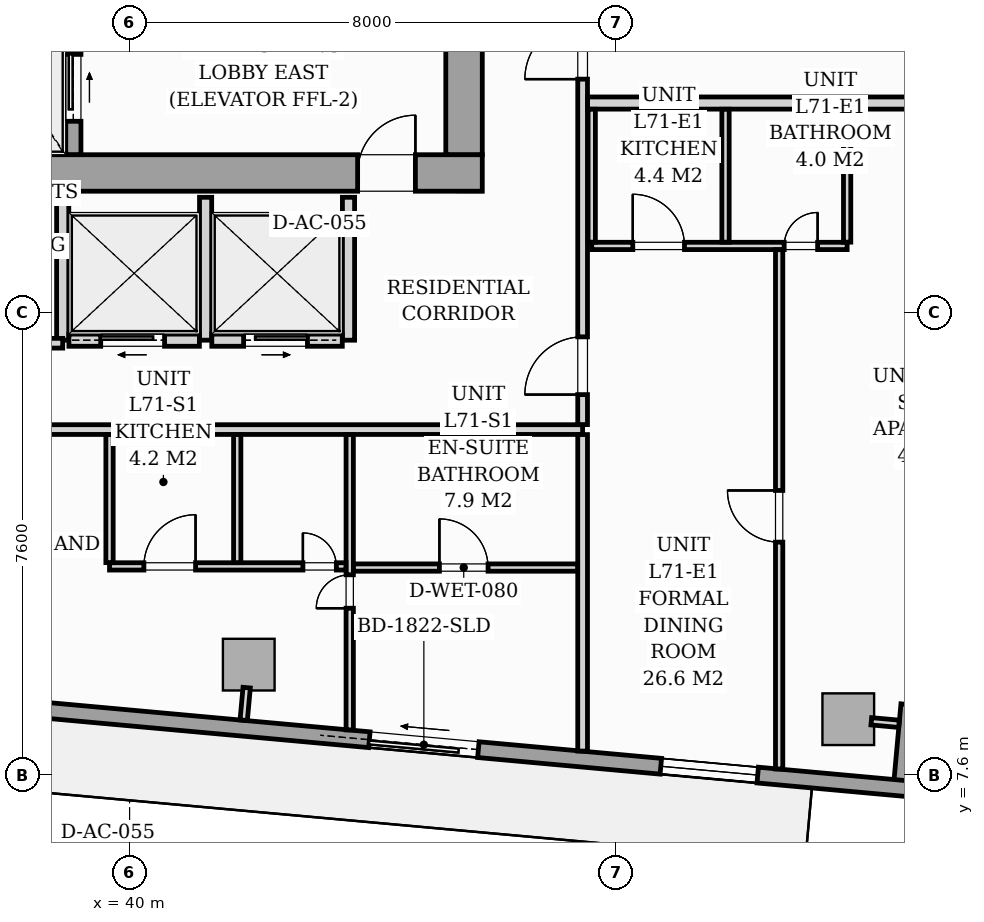
"""IFC4 building model, lengths in metres.
Left out: names, types, materials, properties, quantities, classifications, styles, units other than length and angle.
Written with IfcOpenShell. Run it as: python <this file> out.ifc"""

import sys

from ifc_helpers import new_model, si_unit, direction, frame, frame_2d, origin, origin_2d, place, context, subcontext, project, spatial, rectangle, i_section, extrude, source, transform, mapped, element, fill, save


model = new_model("IFC4")
c1 = context("Model", 3, precision=1e-05, world=origin(), true_north=direction((0.0, 1.0)))
c2 = subcontext(c1, "Body", "Model", "MODEL_VIEW")
j1 = project(units=[si_unit("LENGTHUNIT", "METRE"), si_unit("PLANEANGLEUNIT", "RADIAN")], contexts=[c1])
p1 = place(None, origin())
s1 = spatial("IfcSite", under=j1, at=p1, CompositionType="ELEMENT")
p2 = place(p1, origin())
s2 = spatial("IfcBuilding", under=s1, at=p2, CompositionType="ELEMENT")
p3 = place(p2, frame((0.0, 0.0, 246.3)))
s3 = spatial("IfcBuildingStorey", under=s2, at=p3, CompositionType="ELEMENT", Elevation=246.3)
m1 = source(origin(), c2, "Body", "SweptSolid", [
    extrude(i_section(OverallWidth=0.409, OverallDepth=0.425, WebThickness=0.033, FlangeThickness=0.052, FilletRadius=0.018, at=origin_2d()), origin(), (0.0, 0.0, 1.0), 3.296),
])
for number, where, z_axis, x_axis in (
    (1, (38.88, 17.4, 0.002), (0.0, 0.0, 1.0), (1.0, 0.0, 0.0)),
    (2, (45.6, 17.4, 0.002), (0.0, 0.0, 1.0), (1.0, 0.0, 0.0)),
):
    element("IfcColumn", number, at=place(p3, frame(where, z_axis=z_axis, x_axis=x_axis)), inside=s3, PredefinedType="PILASTER", context=c2, shape_type="MappedRepresentation", body=[
        mapped(m1, transform((0.0, 0.0, 0.0), scale=1.0)),
    ])
m2 = source(origin(), c2, "Body", "SweptSolid", [
    extrude(rectangle(XDim=0.85, YDim=0.85, at=origin_2d()), origin(), (0.0, 0.0, 1.0), 3.296),
])
for number, where, z_axis, x_axis in (
    (3, (41.96, 9.415, 0.002), (0.0, 0.0, 1.0), (0.996, -0.091, 0.0)),
    (4, (51.819, 8.517, 0.002), (0.0, 0.0, 1.0), (0.996, -0.091, 0.0)),
):
    element("IfcColumn", number, at=place(p3, frame(where, z_axis=z_axis, x_axis=x_axis)), inside=s3, PredefinedType="COLUMN", context=c2, shape_type="MappedRepresentation", body=[
        mapped(m2, transform((0.0, 0.0, 0.0), scale=1.0)),
    ])
p4 = place(p3, frame((52.815, 8.758, 0.0), z_axis=(0.0, 0.0, 1.0), x_axis=(-0.090646191665, -0.995883159782, 0.0)))
e5 = element("IfcWall", 5, at=p4, inside=s3, PredefinedType="STANDARD", context=c2, shape_type="SweptSolid", body=[
    extrude(rectangle(XDim=1.395, YDim=0.26, at=frame_2d((0.698, 0.0))), origin(), (0.0, 0.0, 1.0), 3.04),
])
p5 = place(p3, frame((52.819, 7.372, 0.0), z_axis=(0.0, 0.0, 1.0), x_axis=(-0.995884447498, 0.090632043071, 0.0)))
e6 = element("IfcWall", 6, at=p5, inside=s3, PredefinedType="STANDARD", context=c2, shape_type="SweptSolid", body=[
    extrude(rectangle(XDim=14.63, YDim=0.26, at=frame_2d((7.315, 0.0))), origin(), (0.0, 0.0, 1.0), 3.04),
])
p6 = place(p5, frame((7.113, 0.0, 0.0)))
e7 = element("IfcOpeningElement", 7, at=p6, cuts=e6, PredefinedType="OPENING", context=c2, shape_type="SweptSolid", body=[
    extrude(rectangle(XDim=1.8, YDim=2.06, at=frame_2d((0.9, 1.03))), frame((0.0, 0.14, 0.0), z_axis=(0.0, -1.0, 0.0), x_axis=(1.0, 0.0, 0.0)), (0.0, 0.0, 1.0), 0.28),
])
p7 = place(p5, frame((2.5, 0.0, 0.65)))
e8 = element("IfcOpeningElement", 8, at=p7, cuts=e6, PredefinedType="OPENING", context=c2, shape_type="SweptSolid", body=[
    extrude(rectangle(XDim=1.6, YDim=1.5, at=frame_2d((0.8, 0.75))), frame((0.0, 0.14, 0.0), z_axis=(0.0, -1.0, 0.0), x_axis=(1.0, 0.0, 0.0)), (0.0, 0.0, 1.0), 0.28),
])
p8 = place(p3, frame((26.2, 17.5, 0.0), z_axis=(0.0, 0.0, 1.0), x_axis=(1.0, 0.0, 0.0)))
e9 = element("IfcWall", 9, at=p8, inside=s3, PredefinedType="SHEAR", context=c2, shape_type="SweptSolid", body=[
    extrude(rectangle(XDim=19.6, YDim=0.6, at=frame_2d((9.8, 0.0))), origin(), (0.0, 0.0, 1.0), 3.3),
])
p9 = place(p8, frame((0.95, 0.0, 0.0)))
e10 = element("IfcOpeningElement", 10, at=p9, cuts=e9, PredefinedType="OPENING", context=c2, shape_type="SweptSolid", body=[
    extrude(rectangle(XDim=0.95, YDim=2.06, at=frame_2d((0.475, 1.03))), frame((0.0, 0.31, 0.0), z_axis=(0.0, -1.0, 0.0), x_axis=(1.0, 0.0, 0.0)), (0.0, 0.0, 1.0), 0.62),
])
p10 = place(p8, frame((9.38, 0.0, 0.0)))
e11 = element("IfcOpeningElement", 11, at=p10, cuts=e9, PredefinedType="OPENING", context=c2, shape_type="SweptSolid", body=[
    extrude(rectangle(XDim=0.85, YDim=2.0, at=frame_2d((0.425, 1.0))), frame((0.0, 0.31, 0.0), z_axis=(0.0, -1.0, 0.0), x_axis=(1.0, 0.0, 0.0)), (0.0, 0.0, 1.0), 0.62),
])
p11 = place(p8, frame((17.55, 0.0, 0.0)))
e12 = element("IfcOpeningElement", 12, at=p11, cuts=e9, PredefinedType="OPENING", context=c2, shape_type="SweptSolid", body=[
    extrude(rectangle(XDim=0.95, YDim=2.06, at=frame_2d((0.475, 1.03))), frame((0.0, 0.31, 0.0), z_axis=(0.0, -1.0, 0.0), x_axis=(1.0, 0.0, 0.0)), (0.0, 0.0, 1.0), 0.62),
])
p12 = place(p3, frame((45.5, 17.802, 0.0), z_axis=(0.0, 0.0, 1.0), x_axis=(0.0, 1.0, 0.0)))
e13 = element("IfcWall", 13, at=p12, inside=s3, PredefinedType="SHEAR", context=c2, shape_type="SweptSolid", body=[
    extrude(rectangle(XDim=5.796, YDim=0.6, at=frame_2d((2.898, 0.0))), origin(), (0.0, 0.0, 1.0), 3.3),
])
p13 = place(p3, frame((39.075, 17.802, 0.0), z_axis=(0.0, 0.0, 1.0), x_axis=(0.0, 1.0, 0.0)))
e14 = element("IfcWall", 14, at=p13, inside=s3, PredefinedType="SOLIDWALL", context=c2, shape_type="SweptSolid", body=[
    extrude(rectangle(XDim=2.646, YDim=0.25, at=frame_2d((1.323, 0.0))), origin(), (0.0, 0.0, 1.0), 3.3),
])
p14 = place(p13, frame((0.548, 0.0, 0.0)))
e15 = element("IfcOpeningElement", 15, at=p14, cuts=e14, PredefinedType="OPENING", context=c2, shape_type="SweptSolid", body=[
    extrude(rectangle(XDim=1.1, YDim=2.08, at=frame_2d((0.55, 1.04))), frame((0.0, 0.135, 0.0), z_axis=(0.0, -1.0, 0.0), x_axis=(1.0, 0.0, 0.0)), (0.0, 0.0, 1.0), 0.27),
])
for number, where, z_axis, x_axis in (
    (16, (38.9, 14.75, 0.0), (0.0, 0.0, 1.0), (0.0, 1.0, 0.0)),
    (17, (41.25, 14.75, 0.0), (0.0, 0.0, 1.0), (0.0, 1.0, 0.0)),
    (18, (43.6, 14.75, 0.0), (0.0, 0.0, 1.0), (0.0, 1.0, 0.0)),
):
    element("IfcWall", number, at=place(p3, frame(where, z_axis=z_axis, x_axis=x_axis)), inside=s3, PredefinedType="PARTITIONING", context=c2, shape_type="SweptSolid", body=[
        extrude(rectangle(XDim=2.35, YDim=0.2, at=frame_2d((1.175, 0.0))), origin(), (0.0, 0.0, 1.0), 3.04),
    ])
p15 = place(p3, frame((39.002, 14.75, 0.0), z_axis=(0.0, 0.0, 1.0), x_axis=(1.0, 0.0, 0.0)))
e19 = element("IfcWall", 19, at=p15, inside=s3, PredefinedType="PARTITIONING", context=c2, shape_type="SweptSolid", body=[
    extrude(rectangle(XDim=2.146, YDim=0.2, at=frame_2d((1.073, 0.0))), origin(), (0.0, 0.0, 1.0), 3.04),
])
p16 = place(p15, frame((0.523, 0.0, 0.0)))
e20 = element("IfcOpeningElement", 20, at=p16, cuts=e19, PredefinedType="OPENING", context=c2, shape_type="SweptSolid", body=[
    extrude(rectangle(XDim=1.05, YDim=2.08, at=frame_2d((0.525, 1.04))), frame((0.0, 0.11, 0.0), z_axis=(0.0, -1.0, 0.0), x_axis=(1.0, 0.0, 0.0)), (0.0, 0.0, 1.0), 0.22),
])
p17 = place(p3, frame((41.352, 14.75, 0.0), z_axis=(0.0, 0.0, 1.0), x_axis=(1.0, 0.0, 0.0)))
e21 = element("IfcWall", 21, at=p17, inside=s3, PredefinedType="PARTITIONING", context=c2, shape_type="SweptSolid", body=[
    extrude(rectangle(XDim=2.146, YDim=0.2, at=frame_2d((1.073, 0.0))), origin(), (0.0, 0.0, 1.0), 3.04),
])
p18 = place(p17, frame((0.523, 0.0, 0.0)))
e22 = element("IfcOpeningElement", 22, at=p18, cuts=e21, PredefinedType="OPENING", context=c2, shape_type="SweptSolid", body=[
    extrude(rectangle(XDim=1.05, YDim=2.08, at=frame_2d((0.525, 1.04))), frame((0.0, 0.11, 0.0), z_axis=(0.0, -1.0, 0.0), x_axis=(1.0, 0.0, 0.0)), (0.0, 0.0, 1.0), 0.22),
])
p19 = place(p3, frame((24.55, 13.28, 0.0), z_axis=(0.0, 0.0, 1.0), x_axis=(1.0, 0.0, 0.0)))
e23 = element("IfcWall", 23, at=p19, inside=s3, PredefinedType="PARTITIONING", context=c2, shape_type="SweptSolid", body=[
    extrude(rectangle(XDim=22.9, YDim=0.16, at=frame_2d((11.45, 0.0))), origin(), (0.0, 0.0, 1.0), 2.556),
])
p20 = place(p19, frame((7.125, 0.0, 0.0)))
e24 = element("IfcOpeningElement", 24, at=p20, cuts=e23, PredefinedType="OPENING", context=c2, shape_type="SweptSolid", body=[
    extrude(rectangle(XDim=0.95, YDim=2.06, at=frame_2d((0.475, 1.03))), frame((0.0, 0.09, 0.0), z_axis=(0.0, -1.0, 0.0), x_axis=(1.0, 0.0, 0.0)), (0.0, 0.0, 1.0), 0.18),
])
p21 = place(p3, frame((47.45, 7.993, 0.0), z_axis=(0.0, 0.0, 1.0), x_axis=(0.0, 1.0, 0.0)))
e25 = element("IfcWall", 25, at=p21, inside=s3, PredefinedType="PARTITIONING", context=c2, shape_type="SweptSolid", body=[
    extrude(rectangle(XDim=5.205, YDim=0.16, at=frame_2d((2.603, 0.0))), origin(), (0.0, 0.0, 1.0), 3.04),
])
p22 = place(p3, frame((47.45, 13.362, 0.0), z_axis=(0.0, 0.0, 1.0), x_axis=(0.0, 1.0, 0.0)))
e26 = element("IfcWall", 26, at=p22, inside=s3, PredefinedType="PARTITIONING", context=c2, shape_type="SweptSolid", body=[
    extrude(rectangle(XDim=7.288, YDim=0.16, at=frame_2d((3.644, 0.0))), origin(), (0.0, 0.0, 1.0), 3.04),
])
p23 = place(p22, frame((0.493, 0.0, 0.0)))
e27 = element("IfcOpeningElement", 27, at=p23, cuts=e26, PredefinedType="OPENING", context=c2, shape_type="SweptSolid", body=[
    extrude(rectangle(XDim=0.95, YDim=2.06, at=frame_2d((0.475, 1.03))), frame((0.0, 0.09, 0.0), z_axis=(0.0, -1.0, 0.0), x_axis=(1.0, 0.0, 0.0)), (0.0, 0.0, 1.0), 0.18),
])
p24 = place(p22, frame((5.681, 0.0, 0.0)))
e28 = element("IfcOpeningElement", 28, at=p24, cuts=e26, PredefinedType="OPENING", context=c2, shape_type="SweptSolid", body=[
    extrude(rectangle(XDim=0.95, YDim=2.06, at=frame_2d((0.475, 1.03))), frame((0.0, 0.09, 0.0), z_axis=(0.0, -1.0, 0.0), x_axis=(1.0, 0.0, 0.0)), (0.0, 0.0, 1.0), 0.18),
])
p25 = place(p3, frame((43.62, 8.342, 0.0), z_axis=(0.0, 0.0, 1.0), x_axis=(0.0, 1.0, 0.0)))
e29 = element("IfcWall", 29, at=p25, inside=s3, PredefinedType="PARTITIONING", context=c2, shape_type="SweptSolid", body=[
    extrude(rectangle(XDim=4.856, YDim=0.12, at=frame_2d((2.428, 0.0))), origin(), (0.0, 0.0, 1.0), 3.04),
])
p26 = place(p25, frame((2.0, 0.0, 0.0)))
e30 = element("IfcOpeningElement", 30, at=p26, cuts=e29, PredefinedType="OPENING", context=c2, shape_type="SweptSolid", body=[
    extrude(rectangle(XDim=0.55, YDim=2.0, at=frame_2d((0.275, 1.0))), frame((0.0, 0.07, 0.0), z_axis=(0.0, -1.0, 0.0), x_axis=(1.0, 0.0, 0.0)), (0.0, 0.0, 1.0), 0.14),
])
p27 = place(p3, frame((39.67, 11.03, 0.0), z_axis=(0.0, 0.0, 1.0), x_axis=(1.0, 0.0, 0.0)))
e31 = element("IfcWall", 31, at=p27, inside=s3, PredefinedType="PARTITIONING", context=c2, shape_type="SweptSolid", body=[
    extrude(rectangle(XDim=3.888, YDim=0.12, at=frame_2d((1.944, 0.0))), origin(), (0.0, 0.0, 1.0), 3.04),
])
p28 = place(p27, frame((0.565, 0.0, 0.0)))
e32 = element("IfcOpeningElement", 32, at=p28, cuts=e31, PredefinedType="OPENING", context=c2, shape_type="SweptSolid", body=[
    extrude(rectangle(XDim=0.85, YDim=2.05, at=frame_2d((0.425, 1.025))), frame((0.0, 0.07, 0.0), z_axis=(0.0, -1.0, 0.0), x_axis=(1.0, 0.0, 0.0)), (0.0, 0.0, 1.0), 0.14),
])
p29 = place(p27, frame((3.18, 0.0, 0.0)))
e33 = element("IfcOpeningElement", 33, at=p29, cuts=e31, PredefinedType="OPENING", context=c2, shape_type="SweptSolid", body=[
    extrude(rectangle(XDim=0.55, YDim=2.0, at=frame_2d((0.275, 1.0))), frame((0.0, 0.07, 0.0), z_axis=(0.0, -1.0, 0.0), x_axis=(1.0, 0.0, 0.0)), (0.0, 0.0, 1.0), 0.14),
])
for number, where, z_axis, x_axis in (
    (34, (41.77, 11.092, 0.0), (0.0, 0.0, 1.0), (0.0, 1.0, 0.0)),
    (35, (39.67, 11.092, 0.0), (0.0, 0.0, 1.0), (0.0, 1.0, 0.0)),
):
    element("IfcWall", number, at=place(p3, frame(where, z_axis=z_axis, x_axis=x_axis)), inside=s3, PredefinedType="PARTITIONING", context=c2, shape_type="SweptSolid", body=[
        extrude(rectangle(XDim=2.106, YDim=0.12, at=frame_2d((1.053, 0.0))), origin(), (0.0, 0.0, 1.0), 3.04),
    ])
p30 = place(p3, frame((43.682, 11.011, 0.0), z_axis=(0.0, 0.0, 1.0), x_axis=(1.0, 0.0, 0.0)))
e36 = element("IfcWall", 36, at=p30, inside=s3, PredefinedType="PARTITIONING", context=c2, shape_type="SweptSolid", body=[
    extrude(rectangle(XDim=3.686, YDim=0.12, at=frame_2d((1.843, 0.0))), origin(), (0.0, 0.0, 1.0), 3.04),
])
p31 = place(p30, frame((1.413, 0.0, 0.0)))
e37 = element("IfcOpeningElement", 37, at=p31, cuts=e36, PredefinedType="OPENING", context=c2, shape_type="SweptSolid", body=[
    extrude(rectangle(XDim=0.8, YDim=2.02, at=frame_2d((0.4, 1.01))), frame((0.0, 0.07, 0.0), z_axis=(0.0, -1.0, 0.0), x_axis=(1.0, 0.0, 0.0)), (0.0, 0.0, 1.0), 0.14),
])
p32 = place(p3, frame((47.532, 18.65, 0.0), z_axis=(0.0, 0.0, 1.0), x_axis=(1.0, 0.0, 0.0)))
e38 = element("IfcWall", 38, at=p32, inside=s3, PredefinedType="PARTITIONING", context=c2, shape_type="SweptSolid", body=[
    extrude(rectangle(XDim=8.743, YDim=0.2, at=frame_2d((4.372, 0.0))), origin(), (0.0, 0.0, 1.0), 3.04),
])
p33 = place(p3, frame((47.6, 16.3, 0.0), z_axis=(0.0, 0.0, 1.0), x_axis=(1.0, 0.0, 0.0)))
e39 = element("IfcWall", 39, at=p33, inside=s3, PredefinedType="PARTITIONING", context=c2, shape_type="SweptSolid", body=[
    extrude(rectangle(XDim=4.2, YDim=0.12, at=frame_2d((2.1, 0.0))), origin(), (0.0, 0.0, 1.0), 2.381),
])
p34 = place(p33, frame((0.675, 0.0, 0.0)))
e40 = element("IfcOpeningElement", 40, at=p34, cuts=e39, PredefinedType="OPENING", context=c2, shape_type="SweptSolid", body=[
    extrude(rectangle(XDim=0.85, YDim=2.05, at=frame_2d((0.425, 1.025))), frame((0.0, 0.07, 0.0), z_axis=(0.0, -1.0, 0.0), x_axis=(1.0, 0.0, 0.0)), (0.0, 0.0, 1.0), 0.14),
])
p35 = place(p33, frame((3.165, 0.0, 0.0)))
e41 = element("IfcOpeningElement", 41, at=p35, cuts=e39, PredefinedType="OPENING", context=c2, shape_type="SweptSolid", body=[
    extrude(rectangle(XDim=0.55, YDim=2.0, at=frame_2d((0.275, 1.0))), frame((0.0, 0.07, 0.0), z_axis=(0.0, -1.0, 0.0), x_axis=(1.0, 0.0, 0.0)), (0.0, 0.0, 1.0), 0.14),
])
for number, where, z_axis, x_axis in (
    (42, (47.6, 16.362, 0.0), (0.0, 0.0, 1.0), (0.0, 1.0, 0.0)),
    (43, (49.8, 16.362, 0.0), (0.0, 0.0, 1.0), (0.0, 1.0, 0.0)),
    (44, (51.8, 16.362, 0.0), (0.0, 0.0, 1.0), (0.0, 1.0, 0.0)),
):
    element("IfcWall", number, at=place(p3, frame(where, z_axis=z_axis, x_axis=x_axis)), inside=s3, PredefinedType="PARTITIONING", context=c2, shape_type="SweptSolid", body=[
        extrude(rectangle(XDim=2.186, YDim=0.12, at=frame_2d((1.093, 0.0))), origin(), (0.0, 0.0, 1.0), 3.04),
    ])
p36 = place(p3, frame((50.682, 7.699, 0.0), z_axis=(0.0, 0.0, 1.0), x_axis=(0.0, 1.0, 0.0)))
e45 = element("IfcWall", 45, at=p36, inside=s3, PredefinedType="PARTITIONING", context=c2, shape_type="SweptSolid", body=[
    extrude(rectangle(XDim=8.539, YDim=0.12, at=frame_2d((4.27, 0.0))), origin(), (0.0, 0.0, 1.0), 3.04),
])
p37 = place(p36, frame((3.73, 0.0, 0.0)))
e46 = element("IfcOpeningElement", 46, at=p37, cuts=e45, PredefinedType="OPENING", context=c2, shape_type="SweptSolid", body=[
    extrude(rectangle(XDim=0.85, YDim=2.05, at=frame_2d((0.425, 1.025))), frame((0.0, 0.07, 0.0), z_axis=(0.0, -1.0, 0.0), x_axis=(1.0, 0.0, 0.0)), (0.0, 0.0, 1.0), 0.14),
])
p38 = place(p3, frame((36.882, 14.7, 0.0), z_axis=(0.0, 0.0, 1.0), x_axis=(1.0, 0.0, 0.0)))
e47 = element("IfcWall", 47, at=p38, inside=s3, PredefinedType="PARTITIONING", context=c2, shape_type="SweptSolid", body=[
    extrude(rectangle(XDim=2.018, YDim=0.16, at=frame_2d((1.009, 0.0))), origin(), (0.0, 0.0, 1.0), 3.04),
])
p39 = place(p38, frame((0.483, 0.0, 0.0)))
e48 = element("IfcOpeningElement", 48, at=p39, cuts=e47, PredefinedType="OPENING", context=c2, shape_type="SweptSolid", body=[
    extrude(rectangle(XDim=0.95, YDim=2.06, at=frame_2d((0.475, 1.03))), frame((0.0, 0.09, 0.0), z_axis=(0.0, -1.0, 0.0), x_axis=(1.0, 0.0, 0.0)), (0.0, 0.0, 1.0), 0.18),
])
p40 = place(p3, frame((41.925, 9.036, 0.0), z_axis=(0.0, 0.0, 1.0), x_axis=(-0.090740281653, -0.995874591144, 0.0)))
e49 = element("IfcWall", 49, at=p40, inside=s3, PredefinedType="PARTITIONING", context=c2, shape_type="SweptSolid", body=[
    extrude(rectangle(XDim=0.538, YDim=0.12, at=frame_2d((0.269, 0.0))), origin(), (0.0, 0.0, 1.0), 3.04),
])
p41 = place(p3, frame((52.197, 8.483, 0.0), z_axis=(0.0, 0.0, 1.0), x_axis=(0.995884462012, -0.090631883588, 0.0)))
e50 = element("IfcWall", 50, at=p41, inside=s3, PredefinedType="PARTITIONING", context=c2, shape_type="SweptSolid", body=[
    extrude(rectangle(XDim=0.458, YDim=0.12, at=frame_2d((0.229, 0.0))), origin(), (0.0, 0.0, 1.0), 3.04),
])
m3 = source(origin(), c2, "Body", "SweptSolid", [
    extrude(rectangle(XDim=1.8, YDim=2.06, at=frame_2d((0.9, 1.03))), frame((0.0, 0.025, 0.0), z_axis=(0.0, -1.0, 0.0), x_axis=(1.0, 0.0, 0.0)), (0.0, 0.0, 1.0), 0.05),
])
p42 = place(p6, origin())
e51 = element("IfcDoor", 51, at=p42, inside=s3, OperationType="SLIDING_TO_RIGHT", PredefinedType="DOOR", context=c2, shape_type="MappedRepresentation", body=[
    mapped(m3, transform((0.0, 0.0, 0.0), scale=1.0)),
])
fill(e7, e51)
m4 = source(origin(), c2, "Body", "SweptSolid", [
    extrude(rectangle(XDim=1.6, YDim=1.5, at=frame_2d((0.8, 0.75))), frame((0.0, 0.03, 0.0), z_axis=(0.0, -1.0, 0.0), x_axis=(1.0, 0.0, 0.0)), (0.0, 0.0, 1.0), 0.06),
])
p43 = place(p7, origin())
e52 = element("IfcWindow", 52, at=p43, inside=s3, PartitioningType="SINGLE_PANEL", PredefinedType="WINDOW", context=c2, shape_type="MappedRepresentation", body=[
    mapped(m4, transform((0.0, 0.0, 0.0), scale=1.0)),
])
fill(e8, e52)
m5 = source(origin(), c2, "Body", "SweptSolid", [
    extrude(rectangle(XDim=0.95, YDim=2.06, at=frame_2d((0.475, 1.03))), frame((0.0, 0.025, 0.0), z_axis=(0.0, -1.0, 0.0), x_axis=(1.0, 0.0, 0.0)), (0.0, 0.0, 1.0), 0.05),
])
p44 = place(p11, origin())
e53 = element("IfcDoor", 53, at=p44, inside=s3, OperationType="SINGLE_SWING_RIGHT", PredefinedType="DOOR", context=c2, shape_type="MappedRepresentation", body=[
    mapped(m5, transform((0.0, 0.0, 0.0), scale=1.0)),
])
fill(e12, e53)
m6 = source(origin(), c2, "Body", "SweptSolid", [
    extrude(rectangle(XDim=1.1, YDim=2.08, at=frame_2d((0.55, 1.04))), frame((0.0, 0.025, 0.0), z_axis=(0.0, -1.0, 0.0), x_axis=(1.0, 0.0, 0.0)), (0.0, 0.0, 1.0), 0.05),
])
p45 = place(p14, origin())
e54 = element("IfcDoor", 54, at=p45, inside=s3, OperationType="SLIDING_TO_RIGHT", PredefinedType="DOOR", context=c2, shape_type="MappedRepresentation", body=[
    mapped(m6, transform((0.0, 0.0, 0.0), scale=1.0)),
])
fill(e15, e54)
m7 = source(origin(), c2, "Body", "SweptSolid", [
    extrude(rectangle(XDim=1.05, YDim=2.08, at=frame_2d((0.525, 1.04))), frame((0.0, 0.025, 0.0), z_axis=(0.0, -1.0, 0.0), x_axis=(1.0, 0.0, 0.0)), (0.0, 0.0, 1.0), 0.05),
])
p46 = place(p16, origin())
e55 = element("IfcDoor", 55, at=p46, inside=s3, OperationType="SLIDING_TO_LEFT", PredefinedType="DOOR", context=c2, shape_type="MappedRepresentation", body=[
    mapped(m7, transform((0.0, 0.0, 0.0), scale=1.0)),
])
fill(e20, e55)
p47 = place(p18, origin())
e56 = element("IfcDoor", 56, at=p47, inside=s3, OperationType="SLIDING_TO_RIGHT", PredefinedType="DOOR", context=c2, shape_type="MappedRepresentation", body=[
    mapped(m7, transform((0.0, 0.0, 0.0), scale=1.0)),
])
fill(e22, e56)
m8 = source(origin(), c2, "Body", "SweptSolid", [
    extrude(rectangle(XDim=0.8, YDim=2.02, at=frame_2d((0.4, 1.01))), frame((0.0, 0.025, 0.0), z_axis=(0.0, -1.0, 0.0), x_axis=(1.0, 0.0, 0.0)), (0.0, 0.0, 1.0), 0.05),
])
p48 = place(p31, origin())
e57 = element("IfcDoor", 57, at=p48, inside=s3, OperationType="SINGLE_SWING_LEFT", PredefinedType="DOOR", context=c2, shape_type="MappedRepresentation", body=[
    mapped(m8, transform((0.0, 0.0, 0.0), scale=1.0)),
])
fill(e37, e57)
m9 = source(origin(), c2, "Body", "SweptSolid", [
    extrude(rectangle(XDim=0.55, YDim=2.0, at=frame_2d((0.275, 1.0))), frame((0.0, 0.025, 0.0), z_axis=(0.0, -1.0, 0.0), x_axis=(1.0, 0.0, 0.0)), (0.0, 0.0, 1.0), 0.05),
])
p49 = place(p26, origin())
e58 = element("IfcDoor", 58, at=p49, inside=s3, OperationType="SINGLE_SWING_LEFT", PredefinedType="DOOR", context=c2, shape_type="MappedRepresentation", body=[
    mapped(m9, transform((0.0, 0.0, 0.0), scale=1.0)),
])
fill(e30, e58)
m10 = source(origin(), c2, "Body", "SweptSolid", [
    extrude(rectangle(XDim=0.85, YDim=2.05, at=frame_2d((0.425, 1.025))), frame((0.0, 0.025, 0.0), z_axis=(0.0, -1.0, 0.0), x_axis=(1.0, 0.0, 0.0)), (0.0, 0.0, 1.0), 0.05),
])
p50 = place(p28, origin())
e59 = element("IfcDoor", 59, at=p50, inside=s3, OperationType="SINGLE_SWING_RIGHT", PredefinedType="DOOR", context=c2, shape_type="MappedRepresentation", body=[
    mapped(m10, transform((0.0, 0.0, 0.0), scale=1.0)),
])
fill(e32, e59)
p51 = place(p29, origin())
e60 = element("IfcDoor", 60, at=p51, inside=s3, OperationType="SINGLE_SWING_LEFT", PredefinedType="DOOR", context=c2, shape_type="MappedRepresentation", body=[
    mapped(m9, transform((0.0, 0.0, 0.0), scale=1.0)),
])
fill(e33, e60)
m11 = source(origin(), c2, "Body", "SweptSolid", [
    extrude(rectangle(XDim=0.95, YDim=2.06, at=frame_2d((0.475, 1.03))), frame((0.0, 0.025, 0.0), z_axis=(0.0, -1.0, 0.0), x_axis=(1.0, 0.0, 0.0)), (0.0, 0.0, 1.0), 0.05),
])
p52 = place(p23, origin())
e61 = element("IfcDoor", 61, at=p52, inside=s3, OperationType="SINGLE_SWING_LEFT", PredefinedType="DOOR", context=c2, shape_type="MappedRepresentation", body=[
    mapped(m11, transform((0.0, 0.0, 0.0), scale=1.0)),
])
fill(e27, e61)
p53 = place(p37, origin())
e62 = element("IfcDoor", 62, at=p53, inside=s3, OperationType="SINGLE_SWING_RIGHT", PredefinedType="DOOR", context=c2, shape_type="MappedRepresentation", body=[
    mapped(m10, transform((0.0, 0.0, 0.0), scale=1.0)),
])
fill(e46, e62)
p54 = place(p34, origin())
e63 = element("IfcDoor", 63, at=p54, inside=s3, OperationType="SINGLE_SWING_LEFT", PredefinedType="DOOR", context=c2, shape_type="MappedRepresentation", body=[
    mapped(m10, transform((0.0, 0.0, 0.0), scale=1.0)),
])
fill(e40, e63)
p55 = place(p35, origin())
e64 = element("IfcDoor", 64, at=p55, inside=s3, OperationType="SINGLE_SWING_RIGHT", PredefinedType="DOOR", context=c2, shape_type="MappedRepresentation", body=[
    mapped(m9, transform((0.0, 0.0, 0.0), scale=1.0)),
])
fill(e41, e64)
p56 = place(p24, origin())
e65 = element("IfcDoor", 65, at=p56, inside=s3, OperationType="SINGLE_SWING_LEFT", PredefinedType="DOOR", context=c2, shape_type="MappedRepresentation", body=[
    mapped(m11, transform((0.0, 0.0, 0.0), scale=1.0)),
])
fill(e28, e65)
save(model, sys.argv[1])
